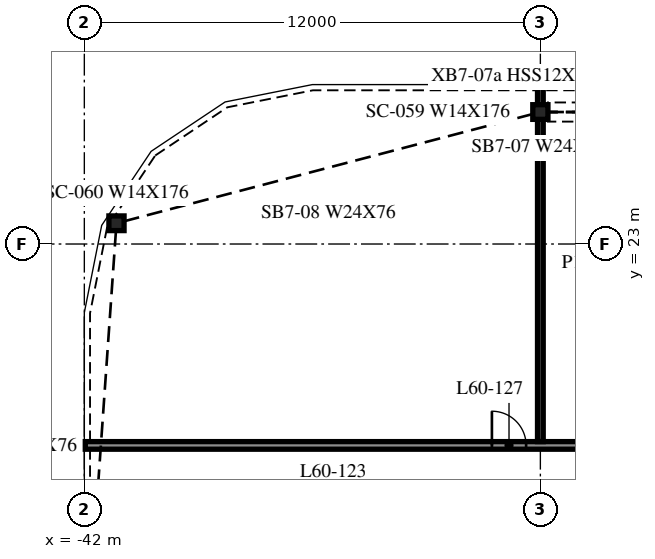
"""IFC4 building model, lengths in metres.
Left out: names, types, materials, properties, quantities, classifications, styles, units other than length and angle.
Written with IfcOpenShell. Run it as: python <this file> out.ifc"""

import sys

from ifc_helpers import new_model, si_unit, direction, frame, frame_2d, origin, origin_2d, place, context, subcontext, project, spatial, rectangle, i_section, extrude, element, fill, save


model = new_model("IFC4")
c1 = context("Model", 3, precision=1e-05, world=origin(), true_north=direction((0.0, 1.0)))
c2 = subcontext(c1, "Body", "Model", "MODEL_VIEW")
j1 = project(units=[si_unit("LENGTHUNIT", "METRE"), si_unit("PLANEANGLEUNIT", "RADIAN")], contexts=[c1])
p1 = place(None, origin())
s1 = spatial("IfcSite", under=j1, at=p1, CompositionType="ELEMENT")
p2 = place(p1, origin())
s2 = spatial("IfcBuilding", under=s1, at=p2, CompositionType="ELEMENT")
p3 = place(p2, frame((0.0, 0.0, 247.6)))
s3 = spatial("IfcBuildingStorey", under=s2, at=p3, CompositionType="ELEMENT", Elevation=247.6)
for number, where, z_axis, x_axis in (
    (1, (-30.0, 26.473, -0.34), (0.0, 0.0, 1.0), (1.0, 0.0, 0.0)),
    (2, (-41.154, 23.546, -0.34), (0.0, 0.0, 1.0), (1.0, 0.0, 0.0)),
):
    element("IfcColumn", number, at=place(p3, frame(where, z_axis=z_axis, x_axis=x_axis)), inside=s3, PredefinedType="COLUMN", context=c2, shape_type="SweptSolid", body=[
        extrude(i_section(OverallWidth=0.399, OverallDepth=0.386, WebThickness=0.021, FlangeThickness=0.033, at=origin_2d()), origin(), (0.0, 0.0, 1.0), 3.8),
    ])
p4 = place(p3, frame((-41.975, 17.7, 0.0), z_axis=(0.0, 0.0, 1.0), x_axis=(1.0, 0.0, 0.0)))
e3 = element("IfcWall", 3, at=p4, inside=s3, PredefinedType="PARTITIONING", context=c2, shape_type="SweptSolid", body=[
    extrude(rectangle(XDim=95.95, YDim=0.2, at=frame_2d((47.975, 0.0))), origin(), (0.0, 0.0, 1.0), 3.46),
])
p5 = place(p4, frame((10.7, 0.0, 0.0)))
e4 = element("IfcOpeningElement", 4, at=p5, cuts=e3, PredefinedType="OPENING", context=c2, shape_type="SweptSolid", body=[
    extrude(rectangle(XDim=0.9, YDim=2.1, at=frame_2d((0.45, 1.05))), frame((0.0, 0.11, 0.0), z_axis=(0.0, -1.0, 0.0), x_axis=(1.0, 0.0, 0.0)), (0.0, 0.0, 1.0), 0.22),
])
p6 = place(p4, frame((13.5, 0.0, 0.0)))
e5 = element("IfcOpeningElement", 5, at=p6, cuts=e3, PredefinedType="OPENING", context=c2, shape_type="SweptSolid", body=[
    extrude(rectangle(XDim=1.0, YDim=2.1, at=frame_2d((0.5, 1.05))), frame((0.0, 0.11, 0.0), z_axis=(0.0, -1.0, 0.0), x_axis=(1.0, 0.0, 0.0)), (0.0, 0.0, 1.0), 0.22),
])
p7 = place(p4, frame((22.7, 0.0, 0.0)))
e6 = element("IfcOpeningElement", 6, at=p7, cuts=e3, PredefinedType="OPENING", context=c2, shape_type="SweptSolid", body=[
    extrude(rectangle(XDim=0.9, YDim=2.1, at=frame_2d((0.45, 1.05))), frame((0.0, 0.11, 0.0), z_axis=(0.0, -1.0, 0.0), x_axis=(1.0, 0.0, 0.0)), (0.0, 0.0, 1.0), 0.22),
])
p8 = place(p4, frame((28.7, 0.0, 0.0)))
e7 = element("IfcOpeningElement", 7, at=p8, cuts=e3, PredefinedType="OPENING", context=c2, shape_type="SweptSolid", body=[
    extrude(rectangle(XDim=0.9, YDim=2.1, at=frame_2d((0.45, 1.05))), frame((0.0, 0.11, 0.0), z_axis=(0.0, -1.0, 0.0), x_axis=(1.0, 0.0, 0.0)), (0.0, 0.0, 1.0), 0.22),
])
p9 = place(p4, frame((40.5, 0.0, 0.0)))
e8 = element("IfcOpeningElement", 8, at=p9, cuts=e3, PredefinedType="OPENING", context=c2, shape_type="SweptSolid", body=[
    extrude(rectangle(XDim=1.0, YDim=2.1, at=frame_2d((0.5, 1.05))), frame((0.0, 0.11, 0.0), z_axis=(0.0, -1.0, 0.0), x_axis=(1.0, 0.0, 0.0)), (0.0, 0.0, 1.0), 0.22),
])
p10 = place(p4, frame((43.5, 0.0, 0.0)))
e9 = element("IfcOpeningElement", 9, at=p10, cuts=e3, PredefinedType="OPENING", context=c2, shape_type="SweptSolid", body=[
    extrude(rectangle(XDim=1.0, YDim=2.1, at=frame_2d((0.5, 1.05))), frame((0.0, 0.11, 0.0), z_axis=(0.0, -1.0, 0.0), x_axis=(1.0, 0.0, 0.0)), (0.0, 0.0, 1.0), 0.22),
])
p11 = place(p4, frame((47.3, 0.0, 0.0)))
e10 = element("IfcOpeningElement", 10, at=p11, cuts=e3, PredefinedType="OPENING", context=c2, shape_type="SweptSolid", body=[
    extrude(rectangle(XDim=0.9, YDim=2.1, at=frame_2d((0.45, 1.05))), frame((0.0, 0.11, 0.0), z_axis=(0.0, -1.0, 0.0), x_axis=(1.0, 0.0, 0.0)), (0.0, 0.0, 1.0), 0.22),
])
p12 = place(p4, frame((54.1, 0.0, 0.0)))
e11 = element("IfcOpeningElement", 11, at=p12, cuts=e3, PredefinedType="OPENING", context=c2, shape_type="SweptSolid", body=[
    extrude(rectangle(XDim=1.0, YDim=2.1, at=frame_2d((0.5, 1.05))), frame((0.0, 0.11, 0.0), z_axis=(0.0, -1.0, 0.0), x_axis=(1.0, 0.0, 0.0)), (0.0, 0.0, 1.0), 0.22),
])
p13 = place(p4, frame((60.1, 0.0, 0.0)))
e12 = element("IfcOpeningElement", 12, at=p13, cuts=e3, PredefinedType="OPENING", context=c2, shape_type="SweptSolid", body=[
    extrude(rectangle(XDim=0.9, YDim=2.1, at=frame_2d((0.45, 1.05))), frame((0.0, 0.11, 0.0), z_axis=(0.0, -1.0, 0.0), x_axis=(1.0, 0.0, 0.0)), (0.0, 0.0, 1.0), 0.22),
])
p14 = place(p4, frame((72.1, 0.0, 0.0)))
e13 = element("IfcOpeningElement", 13, at=p14, cuts=e3, PredefinedType="OPENING", context=c2, shape_type="SweptSolid", body=[
    extrude(rectangle(XDim=0.9, YDim=2.1, at=frame_2d((0.45, 1.05))), frame((0.0, 0.11, 0.0), z_axis=(0.0, -1.0, 0.0), x_axis=(1.0, 0.0, 0.0)), (0.0, 0.0, 1.0), 0.22),
])
p15 = place(p4, frame((75.1, 0.0, 0.0)))
e14 = element("IfcOpeningElement", 14, at=p15, cuts=e3, PredefinedType="OPENING", context=c2, shape_type="SweptSolid", body=[
    extrude(rectangle(XDim=1.0, YDim=2.1, at=frame_2d((0.5, 1.05))), frame((0.0, 0.11, 0.0), z_axis=(0.0, -1.0, 0.0), x_axis=(1.0, 0.0, 0.0)), (0.0, 0.0, 1.0), 0.22),
])
p16 = place(p4, frame((84.1, 0.0, 0.0)))
e15 = element("IfcOpeningElement", 15, at=p16, cuts=e3, PredefinedType="OPENING", context=c2, shape_type="SweptSolid", body=[
    extrude(rectangle(XDim=1.0, YDim=2.1, at=frame_2d((0.5, 1.05))), frame((0.0, 0.11, 0.0), z_axis=(0.0, -1.0, 0.0), x_axis=(1.0, 0.0, 0.0)), (0.0, 0.0, 1.0), 0.22),
])
p17 = place(p4, frame((90.1, 0.0, 0.0)))
e16 = element("IfcOpeningElement", 16, at=p17, cuts=e3, PredefinedType="OPENING", context=c2, shape_type="SweptSolid", body=[
    extrude(rectangle(XDim=0.9, YDim=2.1, at=frame_2d((0.45, 1.05))), frame((0.0, 0.11, 0.0), z_axis=(0.0, -1.0, 0.0), x_axis=(1.0, 0.0, 0.0)), (0.0, 0.0, 1.0), 0.22),
])
p18 = place(p3, frame((-30.0, 17.8, 0.0), z_axis=(0.0, 0.0, 1.0), x_axis=(0.0, 1.0, 0.0)))
e17 = element("IfcWall", 17, at=p18, inside=s3, PredefinedType="PARTITIONING", context=c2, shape_type="SweptSolid", body=[
    extrude(rectangle(XDim=9.37, YDim=0.15, at=frame_2d((4.685, 0.0))), origin(), (0.0, 0.0, 1.0), 3.46),
])
p19 = place(p5, origin())
e18 = element("IfcDoor", 18, at=p19, inside=s3, OperationType="SINGLE_SWING_LEFT", PredefinedType="DOOR", context=c2, shape_type="SweptSolid", body=[
    extrude(rectangle(XDim=0.9, YDim=2.1, at=frame_2d((0.45, 1.05))), frame((0.0, 0.025, 0.0), z_axis=(0.0, -1.0, 0.0), x_axis=(1.0, 0.0, 0.0)), (0.0, 0.0, 1.0), 0.05),
])
fill(e4, e18)
save(model, sys.argv[1])
